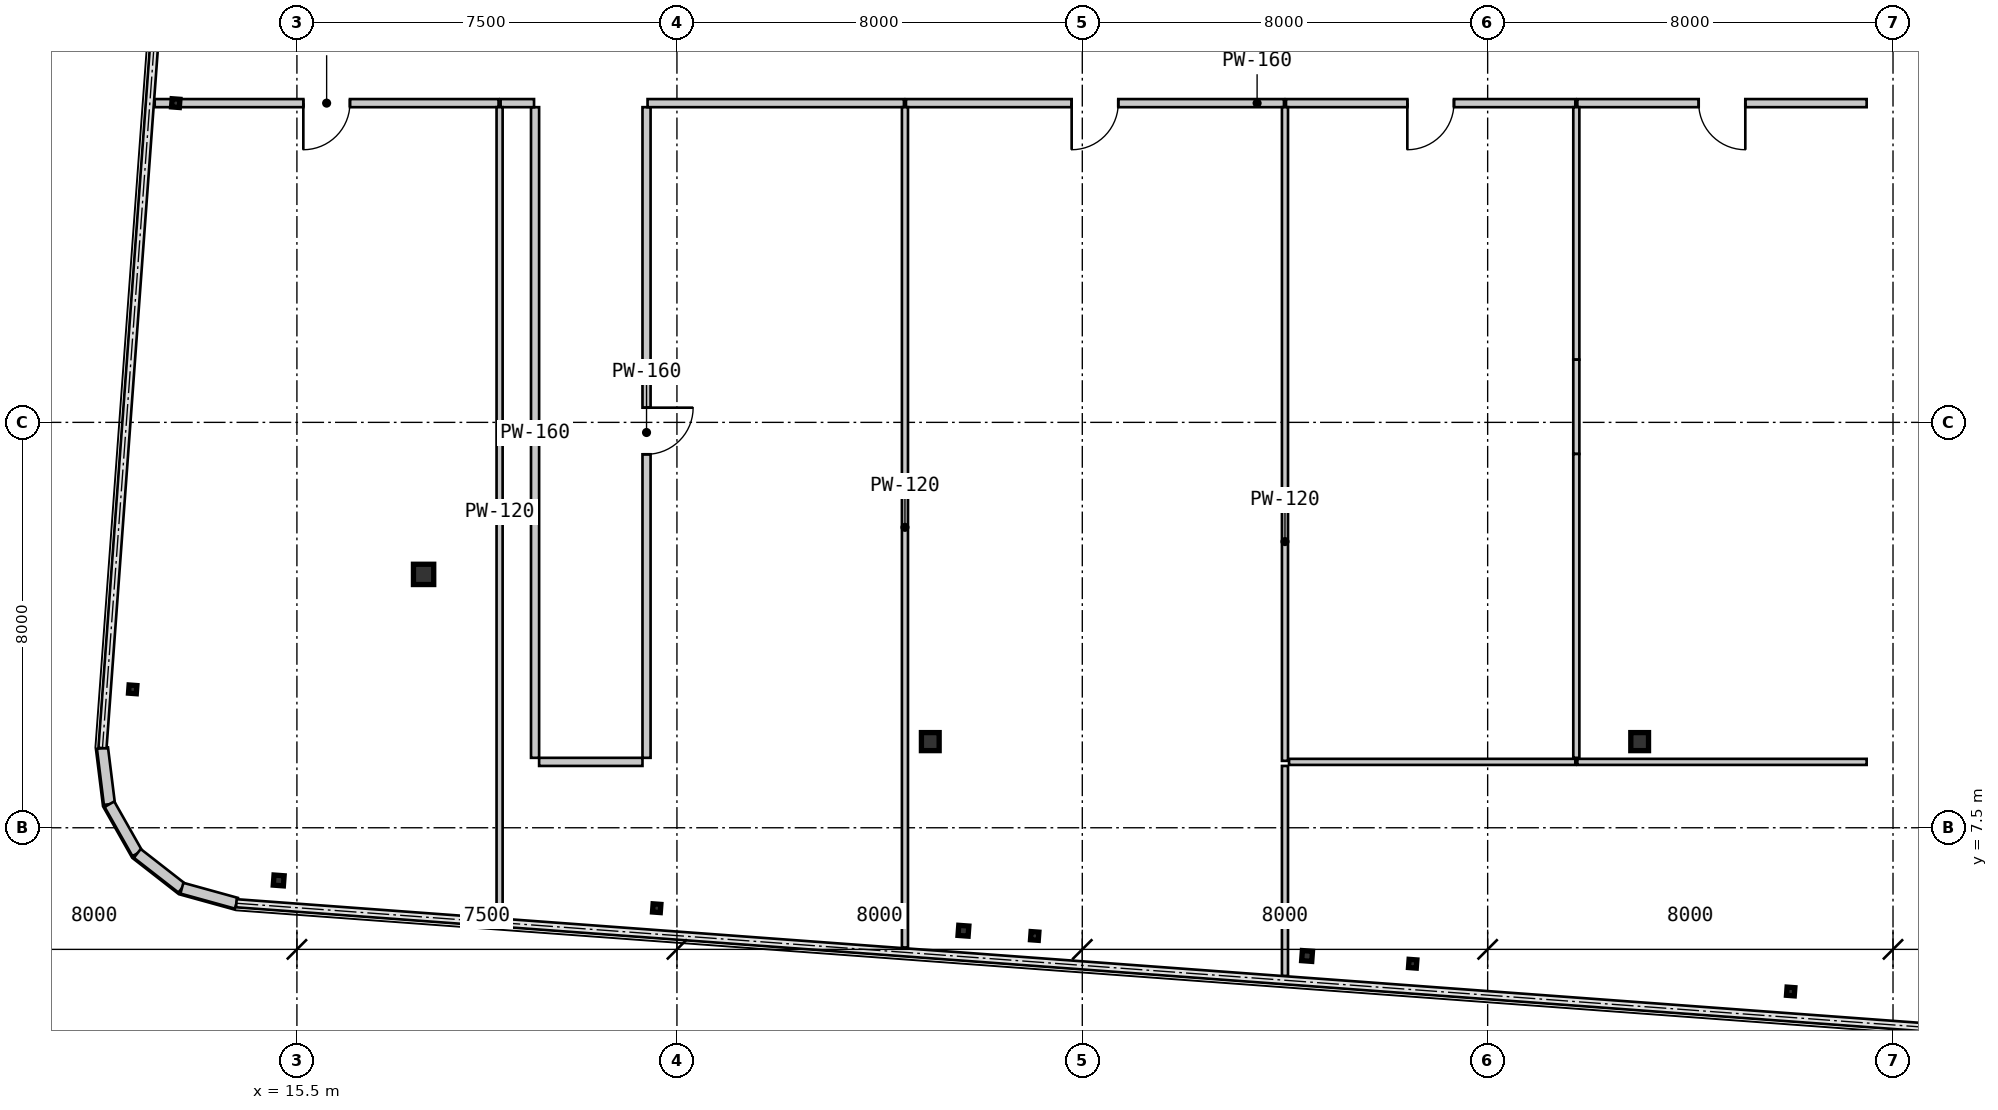
"""IFC4 building model, lengths in metres.
Left out: names, types, materials, properties, quantities, classifications, styles, units other than length and angle.
Written with IfcOpenShell. Run it as: python <this file> out.ifc"""

import sys

from ifc_helpers import new_model, si_unit, direction, frame, frame_2d, origin, origin_2d, place, context, subcontext, project, spatial, rectangle, hollow_rectangle, i_section, extrude, source, transform, mapped, element, fill, save


model = new_model("IFC4")
c1 = context("Model", 3, precision=1e-05, world=origin(), true_north=direction((0.0, 1.0)))
c2 = subcontext(c1, "Body", "Model", "MODEL_VIEW")
j1 = project(units=[si_unit("LENGTHUNIT", "METRE"), si_unit("PLANEANGLEUNIT", "RADIAN")], contexts=[c1])
p1 = place(None, origin())
s1 = spatial("IfcSite", under=j1, at=p1, CompositionType="ELEMENT")
p2 = place(p1, origin())
s2 = spatial("IfcBuilding", under=s1, at=p2, CompositionType="ELEMENT")
p3 = place(p2, frame((0.0, 0.0, 246.05)))
s3 = spatial("IfcBuildingStorey", under=s2, at=p3, CompositionType="ELEMENT", Elevation=246.05)
m1 = source(origin(), c2, "Body", "SweptSolid", [
    extrude(i_section(OverallWidth=0.35, OverallDepth=0.356, WebThickness=0.018, FlangeThickness=0.028, at=origin_2d()), origin(), (0.0, 0.0, 1.0), 3.15),
])
for number, where, z_axis, x_axis in (
    (1, (28.0, 9.2, 0.0), (0.0, 0.0, 1.0), (1.0, 0.0, 0.0)),
    (2, (42.0, 9.2, 0.0), (0.0, 0.0, 1.0), (1.0, 0.0, 0.0)),
):
    element("IfcColumn", number, at=place(p3, frame(where, z_axis=z_axis, x_axis=x_axis)), inside=s3, PredefinedType="COLUMN", context=c2, shape_type="MappedRepresentation", body=[
        mapped(m1, transform((0.0, 0.0, 0.0), scale=1.0)),
    ])
m2 = source(origin(), c2, "Body", "SweptSolid", [
    extrude(hollow_rectangle(XDim=0.4, YDim=0.4, WallThickness=0.016, at=origin_2d()), origin(), (0.0, 0.0, 1.0), 3.15),
])
p4 = place(p3, frame((18.0, 12.5, 0.0), z_axis=(0.0, 0.0, 1.0), x_axis=(1.0, 0.0, 0.0)))
e3 = element("IfcColumn", 3, at=p4, inside=s3, PredefinedType="COLUMN", context=c2, shape_type="MappedRepresentation", body=[
    mapped(m2, transform((0.0, 0.0, 0.0), scale=1.0)),
])
m3 = source(origin(), c2, "Body", "SweptSolid", [
    extrude(hollow_rectangle(XDim=0.2, YDim=0.2, WallThickness=0.009, at=origin_2d()), origin(), (0.0, 0.0, 1.0), 3.15),
])
p5 = place(p3, frame((15.141, 6.46, 0.0), z_axis=(0.0, 0.0, 1.0), x_axis=(0.997314477224, -0.073238197128, 0.0)))
e4 = element("IfcColumn", 4, at=p5, inside=s3, PredefinedType="COLUMN", context=c2, shape_type="MappedRepresentation", body=[
    mapped(m3, transform((0.0, 0.0, 0.0), scale=1.0)),
])
m4 = source(origin(), c2, "Body", "SweptSolid", [
    extrude(i_section(OverallWidth=0.154, OverallDepth=0.162, WebThickness=0.008, FlangeThickness=0.011, at=origin_2d()), origin(), (0.0, 0.0, 1.0), 3.15),
])
for number, where, z_axis, x_axis in (
    (5, (22.601, 5.912, 0.0), (0.0, 0.0, 1.0), (0.997, -0.073, 0.0)),
    (6, (30.061, 5.365, 0.0), (0.0, 0.0, 1.0), (0.997, -0.073, 0.0)),
    (7, (37.521, 4.817, 0.0), (0.0, 0.0, 1.0), (0.997, -0.073, 0.0)),
    (8, (44.98, 4.269, 0.0), (0.0, 0.0, 1.0), (0.997, -0.073, 0.0)),
    (9, (12.259, 10.231, 0.0), (0.0, 0.0, 1.0), (0.997, -0.073, 0.0)),
    (10, (13.109, 21.8, 0.0), (0.0, 0.0, 1.0), (0.997, -0.073, 0.0)),
):
    element("IfcColumn", number, at=place(p3, frame(where, z_axis=z_axis, x_axis=x_axis)), inside=s3, PredefinedType="COLUMN", context=c2, shape_type="MappedRepresentation", body=[
        mapped(m4, transform((0.0, 0.0, 0.0), scale=1.0)),
    ])
for number, where, z_axis, x_axis in (
    (11, (28.654, 5.468, 0.0), (0.0, 0.0, 1.0), (0.997, -0.073, 0.0)),
    (12, (35.436, 4.97, 0.0), (0.0, 0.0, 1.0), (0.997, -0.073, 0.0)),
):
    element("IfcColumn", number, at=place(p3, frame(where, z_axis=z_axis, x_axis=x_axis)), inside=s3, PredefinedType="COLUMN", context=c2, shape_type="MappedRepresentation", body=[
        mapped(m3, transform((0.0, 0.0, 0.0), scale=1.0)),
    ])
m5 = source(origin(), c2, "Body", "SweptSolid", [
    extrude(rectangle(XDim=1.116, YDim=0.22, at=frame_2d((0.558, 0.0))), origin(), (0.0, 0.0, 1.0), 2.93),
])
for number, where, z_axis, x_axis in (
    (13, (11.663, 9.072, 0.0), (0.0, 0.0, 1.0), (0.123, -0.992, 0.0)),
    (14, (11.8, 7.965, 0.0), (0.0, 0.0, 1.0), (0.493, -0.87, 0.0)),
    (15, (12.35, 6.994, 0.0), (0.0, 0.0, 1.0), (0.789, -0.615, 0.0)),
):
    element("IfcWall", number, at=place(p3, frame(where, z_axis=z_axis, x_axis=x_axis)), inside=s3, PredefinedType="SOLIDWALL", context=c2, shape_type="MappedRepresentation", body=[
        mapped(m5, transform((0.0, 0.0, 0.0), scale=1.0)),
    ])
m6 = source(origin(), c2, "Body", "SweptSolid", [
    extrude(rectangle(XDim=1.116, YDim=0.22, at=frame_2d((0.558, 0.0))), origin(), (0.0, 0.0, 1.0), 2.93),
])
p6 = place(p3, frame((13.23, 6.307, 0.0), z_axis=(0.0, 0.0, 1.0), x_axis=(0.963890028874, -0.266300605026, 0.0)))
e16 = element("IfcWall", 16, at=p6, inside=s3, PredefinedType="SOLIDWALL", context=c2, shape_type="MappedRepresentation", body=[
    mapped(m6, transform((0.0, 0.0, 0.0), scale=1.0)),
])
m7 = source(origin(), c2, "Body", "SweptSolid", [
    extrude(rectangle(XDim=6.786, YDim=0.16, at=frame_2d((3.393, 0.0))), origin(), (0.0, 0.0, 1.0), 2.93),
])
p7 = place(p3, frame((19.48, 21.8, 0.0), z_axis=(0.0, 0.0, 1.0), x_axis=(-1.0, 0.0, 0.0)))
e17 = element("IfcWall", 17, at=p7, inside=s3, PredefinedType="PARTITIONING", context=c2, shape_type="MappedRepresentation", body=[
    mapped(m7, transform((0.0, 0.0, 0.0), scale=1.0)),
])
m8 = source(origin(), c2, "Body", "SweptSolid", [
    extrude(rectangle(XDim=0.92, YDim=2.1, at=frame_2d((0.46, 1.05))), frame((0.0, 0.09, 0.0), z_axis=(0.0, -1.0, 0.0), x_axis=(1.0, 0.0, 0.0)), (0.0, 0.0, 1.0), 0.18),
])
p8 = place(p7, frame((2.933, 0.0, 0.0)))
e18 = element("IfcOpeningElement", 18, at=p8, cuts=e17, PredefinedType="OPENING", context=c2, shape_type="MappedRepresentation", body=[
    mapped(m8, transform((0.0, 0.0, 0.0), scale=1.0)),
])
m9 = source(origin(), c2, "Body", "SweptSolid", [
    extrude(rectangle(XDim=12.84, YDim=0.16, at=frame_2d((6.42, 0.0))), origin(), (0.0, 0.0, 1.0), 2.93),
])
p9 = place(p3, frame((20.2, 8.88, 0.0), z_axis=(0.0, 0.0, 1.0), x_axis=(0.0, 1.0, 0.0)))
e19 = element("IfcWall", 19, at=p9, inside=s3, PredefinedType="PARTITIONING", context=c2, shape_type="MappedRepresentation", body=[
    mapped(m9, transform((0.0, 0.0, 0.0), scale=1.0)),
])
p10 = place(p3, frame((22.4, 21.72, 0.0), z_axis=(0.0, 0.0, 1.0), x_axis=(0.0, -1.0, 0.0)))
e20 = element("IfcWall", 20, at=p10, inside=s3, PredefinedType="PARTITIONING", context=c2, shape_type="MappedRepresentation", body=[
    mapped(m9, transform((0.0, 0.0, 0.0), scale=1.0)),
])
p11 = place(p10, frame((5.93, 0.0, 0.0)))
e21 = element("IfcOpeningElement", 21, at=p11, cuts=e20, PredefinedType="OPENING", context=c2, shape_type="MappedRepresentation", body=[
    mapped(m8, transform((0.0, 0.0, 0.0), scale=1.0)),
])
m10 = source(origin(), c2, "Body", "SweptSolid", [
    extrude(rectangle(XDim=5.06, YDim=0.16, at=frame_2d((2.53, 0.0))), origin(), (0.0, 0.0, 1.0), 2.93),
])
p12 = place(p3, frame((27.48, 21.8, 0.0), z_axis=(0.0, 0.0, 1.0), x_axis=(-1.0, 0.0, 0.0)))
e22 = element("IfcWall", 22, at=p12, inside=s3, PredefinedType="PARTITIONING", context=c2, shape_type="MappedRepresentation", body=[
    mapped(m10, transform((0.0, 0.0, 0.0), scale=1.0)),
])
m11 = source(origin(), c2, "Body", "SweptSolid", [
    extrude(rectangle(XDim=2.04, YDim=0.16, at=frame_2d((1.02, 0.0))), origin(), (0.0, 0.0, 1.0), 2.93),
])
p13 = place(p3, frame((22.32, 8.8, 0.0), z_axis=(0.0, 0.0, 1.0), x_axis=(-1.0, 0.0, 0.0)))
e23 = element("IfcWall", 23, at=p13, inside=s3, PredefinedType="PARTITIONING", context=c2, shape_type="MappedRepresentation", body=[
    mapped(m11, transform((0.0, 0.0, 0.0), scale=1.0)),
])
m12 = source(origin(), c2, "Body", "SweptSolid", [
    extrude(rectangle(XDim=0.659, YDim=0.16, at=frame_2d((0.33, 0.0))), origin(), (0.0, 0.0, 1.0), 2.93),
])
p14 = place(p3, frame((20.18, 21.8, 0.0), z_axis=(0.0, 0.0, 1.0), x_axis=(-1.0, 0.0, 0.0)))
e24 = element("IfcWall", 24, at=p14, inside=s3, PredefinedType="PARTITIONING", context=c2, shape_type="MappedRepresentation", body=[
    mapped(m12, transform((0.0, 0.0, 0.0), scale=1.0)),
])
m13 = source(origin(), c2, "Body", "SweptSolid", [
    extrude(rectangle(XDim=7.459, YDim=0.16, at=frame_2d((3.73, 0.0))), origin(), (0.0, 0.0, 1.0), 2.93),
])
p15 = place(p3, frame((34.98, 21.8, 0.0), z_axis=(0.0, 0.0, 1.0), x_axis=(-1.0, 0.0, 0.0)))
e25 = element("IfcWall", 25, at=p15, inside=s3, PredefinedType="PARTITIONING", context=c2, shape_type="MappedRepresentation", body=[
    mapped(m13, transform((0.0, 0.0, 0.0), scale=1.0)),
])
p16 = place(p15, frame((3.27, 0.0, 0.0)))
e26 = element("IfcOpeningElement", 26, at=p16, cuts=e25, PredefinedType="OPENING", context=c2, shape_type="MappedRepresentation", body=[
    mapped(m8, transform((0.0, 0.0, 0.0), scale=1.0)),
])
m14 = source(origin(), c2, "Body", "SweptSolid", [
    extrude(rectangle(XDim=5.709, YDim=0.16, at=frame_2d((2.855, 0.0))), origin(), (0.0, 0.0, 1.0), 2.93),
])
p17 = place(p3, frame((40.73, 21.8, 0.0), z_axis=(0.0, 0.0, 1.0), x_axis=(-1.0, 0.0, 0.0)))
e27 = element("IfcWall", 27, at=p17, inside=s3, PredefinedType="PARTITIONING", context=c2, shape_type="MappedRepresentation", body=[
    mapped(m14, transform((0.0, 0.0, 0.0), scale=1.0)),
])
p18 = place(p17, frame((2.395, 0.0, 0.0)))
e28 = element("IfcOpeningElement", 28, at=p18, cuts=e27, PredefinedType="OPENING", context=c2, shape_type="MappedRepresentation", body=[
    mapped(m8, transform((0.0, 0.0, 0.0), scale=1.0)),
])
p19 = place(p3, frame((46.48, 21.8, 0.0), z_axis=(0.0, 0.0, 1.0), x_axis=(-1.0, 0.0, 0.0)))
e29 = element("IfcWall", 29, at=p19, inside=s3, PredefinedType="PARTITIONING", context=c2, shape_type="MappedRepresentation", body=[
    mapped(m14, transform((0.0, 0.0, 0.0), scale=1.0)),
])
p20 = place(p19, frame((2.395, 0.0, 0.0)))
e30 = element("IfcOpeningElement", 30, at=p20, cuts=e29, PredefinedType="OPENING", context=c2, shape_type="MappedRepresentation", body=[
    mapped(m8, transform((0.0, 0.0, 0.0), scale=1.0)),
])
m15 = source(origin(), c2, "Body", "SweptSolid", [
    extrude(rectangle(XDim=4.145, YDim=0.12, at=frame_2d((2.073, 0.0))), origin(), (0.0, 0.0, 1.0), 2.93),
])
p21 = place(p3, frame((35.0, 4.575, 0.0), z_axis=(0.0, 0.0, 1.0), x_axis=(0.0, 1.0, 0.0)))
e31 = element("IfcWall", 31, at=p21, inside=s3, PredefinedType="PARTITIONING", context=c2, shape_type="MappedRepresentation", body=[
    mapped(m15, transform((0.0, 0.0, 0.0), scale=1.0)),
])
m16 = source(origin(), c2, "Body", "SweptSolid", [
    extrude(rectangle(XDim=5.65, YDim=0.12, at=frame_2d((2.825, 0.0))), origin(), (0.0, 0.0, 1.0), 2.93),
])
p22 = place(p3, frame((35.08, 8.8, 0.0), z_axis=(0.0, 0.0, 1.0), x_axis=(1.0, 0.0, 0.0)))
e32 = element("IfcWall", 32, at=p22, inside=s3, PredefinedType="PARTITIONING", context=c2, shape_type="MappedRepresentation", body=[
    mapped(m16, transform((0.0, 0.0, 0.0), scale=1.0)),
])
m17 = source(origin(), c2, "Body", "SweptSolid", [
    extrude(rectangle(XDim=5.709, YDim=0.12, at=frame_2d((2.855, 0.0))), origin(), (0.0, 0.0, 1.0), 2.93),
])
p23 = place(p3, frame((40.77, 8.8, 0.0), z_axis=(0.0, 0.0, 1.0), x_axis=(1.0, 0.0, 0.0)))
e33 = element("IfcWall", 33, at=p23, inside=s3, PredefinedType="PARTITIONING", context=c2, shape_type="MappedRepresentation", body=[
    mapped(m17, transform((0.0, 0.0, 0.0), scale=1.0)),
])
m18 = source(origin(), c2, "Body", "SweptSolid", [
    extrude(rectangle(XDim=15.995, YDim=0.12, at=frame_2d((7.998, 0.0))), origin(), (0.0, 0.0, 1.0), 2.93),
])
p24 = place(p3, frame((19.5, 21.72, 0.0), z_axis=(0.0, 0.0, 1.0), x_axis=(0.0, -1.0, 0.0)))
e34 = element("IfcWall", 34, at=p24, inside=s3, PredefinedType="PARTITIONING", context=c2, shape_type="MappedRepresentation", body=[
    mapped(m18, transform((0.0, 0.0, 0.0), scale=1.0)),
])
m19 = source(origin(), c2, "Body", "SweptSolid", [
    extrude(rectangle(XDim=16.583, YDim=0.12, at=frame_2d((8.291, 0.0))), origin(), (0.0, 0.0, 1.0), 2.93),
])
p25 = place(p3, frame((27.5, 21.72, 0.0), z_axis=(0.0, 0.0, 1.0), x_axis=(0.0, -1.0, 0.0)))
e35 = element("IfcWall", 35, at=p25, inside=s3, PredefinedType="PARTITIONING", context=c2, shape_type="MappedRepresentation", body=[
    mapped(m19, transform((0.0, 0.0, 0.0), scale=1.0)),
])
m20 = source(origin(), c2, "Body", "SweptSolid", [
    extrude(rectangle(XDim=12.9, YDim=0.12, at=frame_2d((6.45, 0.0))), origin(), (0.0, 0.0, 1.0), 2.93),
])
p26 = place(p3, frame((35.0, 21.72, 0.0), z_axis=(0.0, 0.0, 1.0), x_axis=(0.0, -1.0, 0.0)))
e36 = element("IfcWall", 36, at=p26, inside=s3, PredefinedType="PARTITIONING", context=c2, shape_type="MappedRepresentation", body=[
    mapped(m20, transform((0.0, 0.0, 0.0), scale=1.0)),
])
m21 = source(origin(), c2, "Body", "SweptSolid", [
    extrude(rectangle(XDim=4.982, YDim=0.12, at=frame_2d((2.491, 0.0))), origin(), (0.0, 0.0, 1.0), 2.93),
])
p27 = place(p3, frame((40.75, 21.72, 0.0), z_axis=(0.0, 0.0, 1.0), x_axis=(0.0, -1.0, 0.0)))
e37 = element("IfcWall", 37, at=p27, inside=s3, PredefinedType="PARTITIONING", context=c2, shape_type="MappedRepresentation", body=[
    mapped(m21, transform((0.0, 0.0, 0.0), scale=1.0)),
])
m22 = source(origin(), c2, "Body", "SweptSolid", [
    extrude(rectangle(XDim=1.861, YDim=0.12, at=frame_2d((0.93, 0.0))), origin(), (0.0, 0.0, 1.0), 2.328),
])
p28 = place(p3, frame((40.75, 16.738, 0.0), z_axis=(0.0, 0.0, 1.0), x_axis=(0.0, -1.0, 0.0)))
e38 = element("IfcWall", 38, at=p28, inside=s3, PredefinedType="PARTITIONING", context=c2, shape_type="MappedRepresentation", body=[
    mapped(m22, transform((0.0, 0.0, 0.0), scale=1.0)),
])
m23 = source(origin(), c2, "Body", "SweptSolid", [
    extrude(rectangle(XDim=5.997, YDim=0.12, at=frame_2d((2.999, 0.0))), origin(), (0.0, 0.0, 1.0), 2.93),
])
p29 = place(p3, frame((40.75, 14.877, 0.0), z_axis=(0.0, 0.0, 1.0), x_axis=(0.0, -1.0, 0.0)))
e39 = element("IfcWall", 39, at=p29, inside=s3, PredefinedType="PARTITIONING", context=c2, shape_type="MappedRepresentation", body=[
    mapped(m23, transform((0.0, 0.0, 0.0), scale=1.0)),
])
m24 = source(origin(), c2, "Body", "SweptSolid", [
    extrude(rectangle(XDim=0.92, YDim=2.1, at=frame_2d((0.46, 1.05))), frame((0.0, 0.025, 0.0), z_axis=(0.0, -1.0, 0.0), x_axis=(1.0, 0.0, 0.0)), (0.0, 0.0, 1.0), 0.05),
])
p30 = place(p8, origin())
e40 = element("IfcDoor", 40, at=p30, inside=s3, OperationType="SINGLE_SWING_RIGHT", PredefinedType="DOOR", context=c2, shape_type="MappedRepresentation", body=[
    mapped(m24, transform((0.0, 0.0, 0.0), scale=1.0)),
])
fill(e18, e40)
p31 = place(p11, origin())
e41 = element("IfcDoor", 41, at=p31, inside=s3, OperationType="SINGLE_SWING_LEFT", PredefinedType="DOOR", context=c2, shape_type="MappedRepresentation", body=[
    mapped(m24, transform((0.0, 0.0, 0.0), scale=1.0)),
])
fill(e21, e41)
p32 = place(p16, origin())
e42 = element("IfcDoor", 42, at=p32, inside=s3, OperationType="SINGLE_SWING_RIGHT", PredefinedType="DOOR", context=c2, shape_type="MappedRepresentation", body=[
    mapped(m24, transform((0.0, 0.0, 0.0), scale=1.0)),
])
fill(e26, e42)
p33 = place(p18, origin())
e43 = element("IfcDoor", 43, at=p33, inside=s3, OperationType="SINGLE_SWING_RIGHT", PredefinedType="DOOR", context=c2, shape_type="MappedRepresentation", body=[
    mapped(m24, transform((0.0, 0.0, 0.0), scale=1.0)),
])
fill(e28, e43)
p34 = place(p20, origin())
e44 = element("IfcDoor", 44, at=p34, inside=s3, OperationType="SINGLE_SWING_LEFT", PredefinedType="DOOR", context=c2, shape_type="MappedRepresentation", body=[
    mapped(m24, transform((0.0, 0.0, 0.0), scale=1.0)),
])
fill(e30, e44)
save(model, sys.argv[1])
